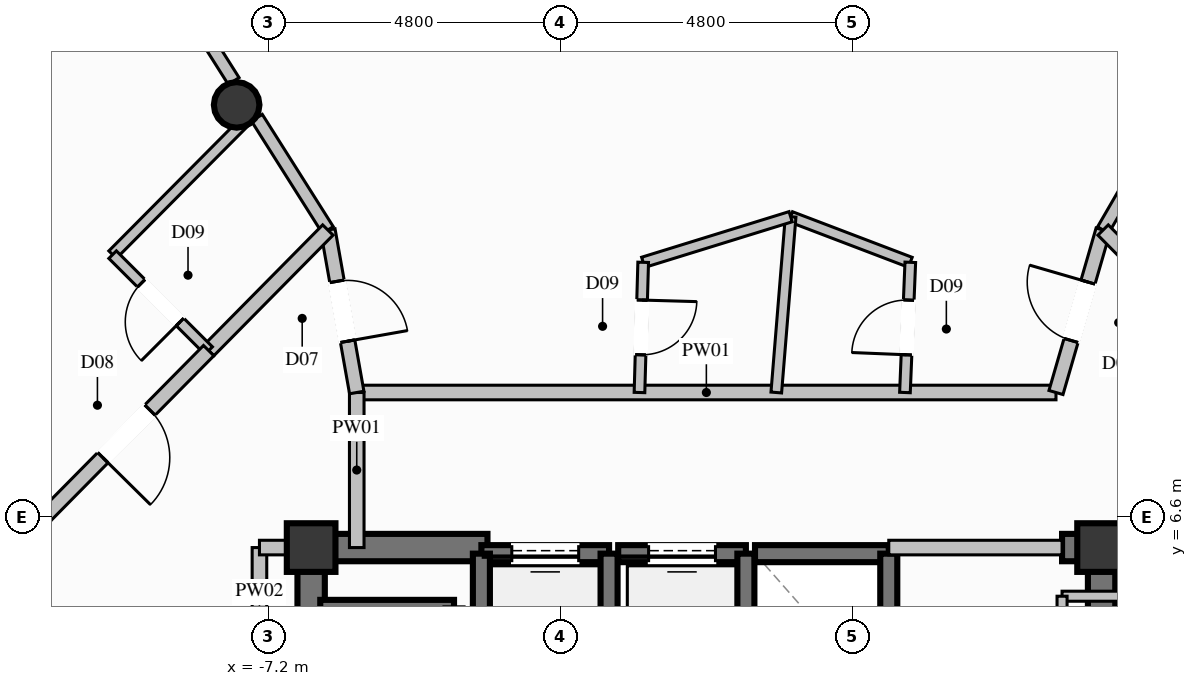
"""IFC4 building model, lengths in metres.
Left out: names, types, materials, properties, quantities, classifications, styles, units other than length and angle.
Written with IfcOpenShell. Run it as: python <this file> out.ifc"""

import sys

from ifc_helpers import new_model, si_unit, direction, frame, frame_2d, origin, origin_2d, place, context, subcontext, project, spatial, rectangle, circle, extrude, element, fill, save


model = new_model("IFC4")
c1 = context("Model", 3, precision=1e-05, world=origin(), true_north=direction((0.0, 1.0)))
c2 = subcontext(c1, "Body", "Model", "MODEL_VIEW")
j1 = project(units=[si_unit("LENGTHUNIT", "METRE"), si_unit("PLANEANGLEUNIT", "RADIAN")], contexts=[c1])
p1 = place(None, origin())
s1 = spatial("IfcSite", under=j1, at=p1, CompositionType="ELEMENT")
p2 = place(p1, origin())
s2 = spatial("IfcBuilding", under=s1, at=p2, CompositionType="ELEMENT")
p3 = place(p2, frame((0.0, 0.0, 289.6)))
s3 = spatial("IfcBuildingStorey", under=s2, at=p3, CompositionType="ELEMENT", Elevation=289.6)
for number, where, z_axis, x_axis in (
    (1, (6.5, 6.1, 0.0), (0.0, 0.0, 1.0), (1.0, 0.0, 0.0)),
    (2, (-6.5, 6.1, 0.0), (0.0, 0.0, 1.0), (1.0, 0.0, 0.0)),
):
    element("IfcColumn", number, at=place(p3, frame(where, z_axis=z_axis, x_axis=x_axis)), inside=s3, PredefinedType="COLUMN", context=c2, shape_type="SweptSolid", body=[
        extrude(rectangle(XDim=0.8, YDim=0.8, at=origin_2d()), origin(), (0.0, 0.0, 1.0), 3.8),
    ])
p4 = place(p3, frame((-6.275, 6.1, 0.0), z_axis=(0.0, 0.0, 1.0), x_axis=(1.0, 0.0, 0.0)))
e3 = element("IfcWall", 3, at=p4, inside=s3, PredefinedType="SHEAR", context=c2, shape_type="SweptSolid", body=[
    extrude(rectangle(XDim=2.675, YDim=0.45, at=frame_2d((1.337, 0.0))), origin(), (0.0, 0.0, 1.0), 3.8),
])
p5 = place(p3, frame((5.85, 6.1, 0.0), z_axis=(0.0, 0.0, 1.0), x_axis=(1.0, 0.0, 0.0)))
e4 = element("IfcWall", 4, at=p5, inside=s3, PredefinedType="SHEAR", context=c2, shape_type="SweptSolid", body=[
    extrude(rectangle(XDim=0.425, YDim=0.45, at=frame_2d((0.212, 0.0))), origin(), (0.0, 0.0, 1.0), 3.8),
])
p6 = place(p3, frame((-6.5, 2.35, 0.0), z_axis=(0.0, 0.0, 1.0), x_axis=(0.0, 1.0, 0.0)))
e5 = element("IfcWall", 5, at=p6, inside=s3, PredefinedType="SHEAR", context=c2, shape_type="SweptSolid", body=[
    extrude(rectangle(XDim=3.975, YDim=0.45, at=frame_2d((1.987, 0.0))), origin(), (0.0, 0.0, 1.0), 3.8),
])
p7 = place(p3, frame((6.5, 3.35, 0.0), z_axis=(0.0, 0.0, 1.0), x_axis=(0.0, 1.0, 0.0)))
e6 = element("IfcWall", 6, at=p7, inside=s3, PredefinedType="SHEAR", context=c2, shape_type="SweptSolid", body=[
    extrude(rectangle(XDim=2.975, YDim=0.45, at=frame_2d((1.487, 0.0))), origin(), (0.0, 0.0, 1.0), 3.8),
])
p8 = place(p3, frame((-7.725, 13.38, 0.0), z_axis=(0.0, 0.0, 1.0), x_axis=(1.0, 0.0, 0.0)))
e7 = element("IfcColumn", 7, at=p8, inside=s3, PredefinedType="COLUMN", context=c2, shape_type="SweptSolid", body=[
    extrude(circle(Radius=0.375, at=origin_2d()), origin(), (0.0, 0.0, 1.0), 3.8),
])
p9 = place(p3, frame((-1.6, 6.0, 0.0), z_axis=(0.0, 0.0, 1.0), x_axis=(-1.0, 0.0, 0.0)))
e8 = element("IfcWall", 8, at=p9, inside=s3, PredefinedType="SOLIDWALL", context=c2, shape_type="SweptSolid", body=[
    extrude(rectangle(XDim=2.1, YDim=0.28, at=frame_2d((1.05, 0.0))), origin(), (0.0, 0.0, 1.0), 3.57),
])
p10 = place(p9, frame((0.5, 0.0, 0.0)))
e9 = element("IfcOpeningElement", 9, at=p10, cuts=e8, PredefinedType="OPENING", context=c2, shape_type="SweptSolid", body=[
    extrude(rectangle(XDim=1.1, YDim=2.2, at=frame_2d((0.55, 1.1))), frame((0.0, 0.15, 0.0), z_axis=(0.0, -1.0, 0.0), x_axis=(1.0, 0.0, 0.0)), (0.0, 0.0, 1.0), 0.3),
])
for number, where, z_axis, x_axis in (
    (10, (-3.7, 6.0, 0.0), (0.0, 0.0, 1.0), (0.0, -1.0, 0.0)),
    (11, (-1.6, 3.5, 0.0), (0.0, 0.0, 1.0), (0.0, 1.0, 0.0)),
):
    element("IfcWall", number, at=place(p3, frame(where, z_axis=z_axis, x_axis=x_axis)), inside=s3, PredefinedType="SOLIDWALL", context=c2, shape_type="SweptSolid", body=[
        extrude(rectangle(XDim=2.5, YDim=0.28, at=frame_2d((1.25, 0.0))), origin(), (0.0, 0.0, 1.0), 3.57),
    ])
p11 = place(p3, frame((0.65, 6.0, 0.0), z_axis=(0.0, 0.0, 1.0), x_axis=(-1.0, 0.0, 0.0)))
e12 = element("IfcWall", 12, at=p11, inside=s3, PredefinedType="SOLIDWALL", context=c2, shape_type="SweptSolid", body=[
    extrude(rectangle(XDim=2.1, YDim=0.28, at=frame_2d((1.05, 0.0))), origin(), (0.0, 0.0, 1.0), 3.57),
])
p12 = place(p11, frame((0.5, 0.0, 0.0)))
e13 = element("IfcOpeningElement", 13, at=p12, cuts=e12, PredefinedType="OPENING", context=c2, shape_type="SweptSolid", body=[
    extrude(rectangle(XDim=1.1, YDim=2.2, at=frame_2d((0.55, 1.1))), frame((0.0, 0.15, 0.0), z_axis=(0.0, -1.0, 0.0), x_axis=(1.0, 0.0, 0.0)), (0.0, 0.0, 1.0), 0.3),
])
p13 = place(p3, frame((0.65, 3.5, 0.0), z_axis=(0.0, 0.0, 1.0), x_axis=(0.0, 1.0, 0.0)))
e14 = element("IfcWall", 14, at=p13, inside=s3, PredefinedType="SOLIDWALL", context=c2, shape_type="SweptSolid", body=[
    extrude(rectangle(XDim=2.5, YDim=0.28, at=frame_2d((1.25, 0.0))), origin(), (0.0, 0.0, 1.0), 3.57),
])
p14 = place(p3, frame((3.0, 6.0, 0.0), z_axis=(0.0, 0.0, 1.0), x_axis=(-1.0, 0.0, 0.0)))
e15 = element("IfcWall", 15, at=p14, inside=s3, PredefinedType="SOLIDWALL", context=c2, shape_type="SweptSolid", body=[
    extrude(rectangle(XDim=2.2, YDim=0.28, at=frame_2d((1.1, 0.0))), origin(), (0.0, 0.0, 1.0), 3.57),
])
p15 = place(p3, frame((3.0, 3.5, 0.0), z_axis=(0.0, 0.0, 1.0), x_axis=(0.0, 1.0, 0.0)))
e16 = element("IfcWall", 16, at=p15, inside=s3, PredefinedType="SOLIDWALL", context=c2, shape_type="SweptSolid", body=[
    extrude(rectangle(XDim=2.5, YDim=0.28, at=frame_2d((1.25, 0.0))), origin(), (0.0, 0.0, 1.0), 3.57),
])
p16 = place(p3, frame((-4.15, 5.1, 0.0), z_axis=(0.0, 0.0, 1.0), x_axis=(-1.0, 0.0, 0.0)))
e17 = element("IfcWall", 17, at=p16, inside=s3, PredefinedType="SOLIDWALL", context=c2, shape_type="SweptSolid", body=[
    extrude(rectangle(XDim=2.2, YDim=0.28, at=frame_2d((1.1, 0.0))), origin(), (0.0, 0.0, 1.0), 3.57),
])
p17 = place(p3, frame((-5.75, 8.65, 0.0), z_axis=(0.0, 0.0, 1.0), x_axis=(1.0, 0.0, 0.0)))
e18 = element("IfcWall", 18, at=p17, inside=s3, PredefinedType="PARTITIONING", context=c2, shape_type="SweptSolid", body=[
    extrude(rectangle(XDim=11.5, YDim=0.24, at=frame_2d((5.75, 0.0))), origin(), (0.0, 0.0, 1.0), 3.57),
])
p18 = place(p3, frame((3.0, 6.1, 0.0), z_axis=(0.0, 0.0, 1.0), x_axis=(1.0, 0.0, 0.0)))
e19 = element("IfcWall", 19, at=p18, inside=s3, PredefinedType="PARTITIONING", context=c2, shape_type="SweptSolid", body=[
    extrude(rectangle(XDim=2.85, YDim=0.24, at=frame_2d((1.425, 0.0))), origin(), (0.0, 0.0, 1.0), 2.655),
])
p19 = place(p3, frame((6.5, 6.1, 0.0), z_axis=(0.0, 0.0, 1.0), x_axis=(1.0, 0.0, 0.0)))
e20 = element("IfcWall", 20, at=p19, inside=s3, PredefinedType="PARTITIONING", context=c2, shape_type="SweptSolid", body=[
    extrude(rectangle(XDim=0.85, YDim=0.24, at=frame_2d((0.425, 0.0))), origin(), (0.0, 0.0, 1.0), 3.085),
])
p20 = place(p3, frame((-5.75, 6.1, 0.0), z_axis=(0.0, 0.0, 1.0), x_axis=(0.0, 1.0, 0.0)))
e21 = element("IfcWall", 21, at=p20, inside=s3, PredefinedType="PARTITIONING", context=c2, shape_type="SweptSolid", body=[
    extrude(rectangle(XDim=2.55, YDim=0.24, at=frame_2d((1.275, 0.0))), origin(), (0.0, 0.0, 1.0), 3.57),
])
p21 = place(p3, frame((-7.35, 4.95, 0.0), z_axis=(0.0, 0.0, 1.0), x_axis=(0.0, 1.0, 0.0)))
e22 = element("IfcWall", 22, at=p21, inside=s3, PredefinedType="PARTITIONING", context=c2, shape_type="SweptSolid", body=[
    extrude(rectangle(XDim=1.15, YDim=0.24, at=frame_2d((0.575, 0.0))), origin(), (0.0, 0.0, 1.0), 2.655),
])
p22 = place(p3, frame((-7.35, 6.1, 0.0), z_axis=(0.0, 0.0, 1.0), x_axis=(1.0, 0.0, 0.0)))
e23 = element("IfcWall", 23, at=p22, inside=s3, PredefinedType="PARTITIONING", context=c2, shape_type="SweptSolid", body=[
    extrude(rectangle(XDim=0.85, YDim=0.24, at=frame_2d((0.425, 0.0))), origin(), (0.0, 0.0, 1.0), 3.085),
])
p23 = place(p3, frame((7.35, 5.3, 0.0), z_axis=(0.0, 0.0, 1.0), x_axis=(-1.0, 0.0, 0.0)))
e24 = element("IfcWall", 24, at=p23, inside=s3, PredefinedType="PARTITIONING", context=c2, shape_type="SweptSolid", body=[
    extrude(rectangle(XDim=1.5, YDim=0.165, at=frame_2d((0.75, 0.0))), origin(), (0.0, 0.0, 1.0), 2.655),
])
p24 = place(p3, frame((5.85, 5.3, 0.0), z_axis=(0.0, 0.0, 1.0), x_axis=(0.0, -1.0, 0.0)))
e25 = element("IfcWall", 25, at=p24, inside=s3, PredefinedType="PARTITIONING", context=c2, shape_type="SweptSolid", body=[
    extrude(rectangle(XDim=2.55, YDim=0.165, at=frame_2d((1.275, 0.0))), origin(), (0.0, 0.0, 1.0), 2.655),
])
p25 = place(p3, frame((6.525, 11.322, 0.0), z_axis=(0.0, 0.0, 1.0), x_axis=(0.501738314133, 0.865019458817, 0.0)))
e26 = element("IfcWall", 26, at=p25, inside=s3, PredefinedType="PARTITIONING", context=c2, shape_type="SweptSolid", body=[
    extrude(rectangle(XDim=1.987, YDim=0.21, at=frame_2d((0.994, 0.0))), origin(), (0.0, 0.0, 1.0), 3.085),
])
p26 = place(p3, frame((-6.225, 11.322, 0.0), z_axis=(0.0, 0.0, 1.0), x_axis=(-0.534363069493, 0.845255056159, 0.0)))
e27 = element("IfcWall", 27, at=p26, inside=s3, PredefinedType="PARTITIONING", context=c2, shape_type="SweptSolid", body=[
    extrude(rectangle(XDim=2.184, YDim=0.21, at=frame_2d((1.092, 0.0))), origin(), (0.0, 0.0, 1.0), 3.085),
])
p27 = place(p3, frame((-7.774, 13.772, 0.0), z_axis=(0.0, 0.0, 1.0), x_axis=(-0.534464578877, 0.845190874256, 0.0)))
e28 = element("IfcWall", 28, at=p27, inside=s3, PredefinedType="PARTITIONING", context=c2, shape_type="SweptSolid", body=[
    extrude(rectangle(XDim=3.817, YDim=0.21, at=frame_2d((1.908, 0.0))), origin(), (0.0, 0.0, 1.0), 3.57),
])
p28 = place(p3, frame((1.386, 11.541, 0.0), z_axis=(0.0, 0.0, 1.0), x_axis=(0.934443654622, -0.356111016871, 0.0)))
e29 = element("IfcWall", 29, at=p28, inside=s3, PredefinedType="PLUMBINGWALL", context=c2, shape_type="SweptSolid", body=[
    extrude(rectangle(XDim=2.106, YDim=0.175, at=frame_2d((1.053, 0.0))), origin(), (0.0, 0.0, 1.0), 3.253),
])
p29 = place(p3, frame((1.386, 11.541, 0.0), z_axis=(0.0, 0.0, 1.0), x_axis=(-0.081387603682, -0.996682526167, 0.0)))
e30 = element("IfcWall", 30, at=p29, inside=s3, PredefinedType="PLUMBINGWALL", context=c2, shape_type="SweptSolid", body=[
    extrude(rectangle(XDim=2.901, YDim=0.175, at=frame_2d((1.45, 0.0))), origin(), (0.0, 0.0, 1.0), 3.57),
])
p30 = place(p3, frame((3.266, 8.65, 0.0), z_axis=(0.0, 0.0, 1.0), x_axis=(0.041014490153, 0.999158551781, 0.0)))
e31 = element("IfcWall", 31, at=p30, inside=s3, PredefinedType="PLUMBINGWALL", context=c2, shape_type="SweptSolid", body=[
    extrude(rectangle(XDim=2.143, YDim=0.175, at=frame_2d((1.071, 0.0))), origin(), (0.0, 0.0, 1.0), 3.57),
])
p31 = place(p30, frame((0.621, 0.0, 0.0)))
e32 = element("IfcOpeningElement", 32, at=p31, cuts=e31, PredefinedType="OPENING", context=c2, shape_type="SweptSolid", body=[
    extrude(rectangle(XDim=0.9, YDim=2.1, at=frame_2d((0.45, 1.05))), frame((0.0, 0.098, 0.0), z_axis=(0.0, -1.0, 0.0), x_axis=(1.0, 0.0, 0.0)), (0.0, 0.0, 1.0), 0.195),
])
p32 = place(p3, frame((5.75, 8.65, 0.0), z_axis=(0.0, 0.0, 1.0), x_axis=(0.27852040308, 0.960430312448, 0.0)))
e33 = element("IfcWall", 33, at=p32, inside=s3, PredefinedType="PARTITIONING", context=c2, shape_type="SweptSolid", body=[
    extrude(rectangle(XDim=2.782, YDim=0.24, at=frame_2d((1.391, 0.0))), origin(), (0.0, 0.0, 1.0), 3.57),
])
p33 = place(p32, frame((0.891, 0.0, 0.0)))
e34 = element("IfcOpeningElement", 34, at=p33, cuts=e33, PredefinedType="OPENING", context=c2, shape_type="SweptSolid", body=[
    extrude(rectangle(XDim=1.0, YDim=2.2, at=frame_2d((0.5, 1.1))), frame((0.0, 0.13, 0.0), z_axis=(0.0, -1.0, 0.0), x_axis=(1.0, 0.0, 0.0)), (0.0, 0.0, 1.0), 0.26),
])
p34 = place(p3, frame((-1.039, 10.791, 0.0), z_axis=(0.0, 0.0, 1.0), x_axis=(0.955353783444, 0.295464293037, 0.0)))
e35 = element("IfcWall", 35, at=p34, inside=s3, PredefinedType="PLUMBINGWALL", context=c2, shape_type="SweptSolid", body=[
    extrude(rectangle(XDim=2.538, YDim=0.175, at=frame_2d((1.269, 0.0))), origin(), (0.0, 0.0, 1.0), 3.253),
])
p35 = place(p3, frame((-1.039, 10.791, 0.0), z_axis=(0.0, 0.0, 1.0), x_axis=(-0.028494696229, -0.999593943703, 0.0)))
e36 = element("IfcWall", 36, at=p35, inside=s3, PredefinedType="PLUMBINGWALL", context=c2, shape_type="SweptSolid", body=[
    extrude(rectangle(XDim=2.142, YDim=0.175, at=frame_2d((1.071, 0.0))), origin(), (0.0, 0.0, 1.0), 3.57),
])
p36 = place(p35, frame((0.621, 0.0, 0.0)))
e37 = element("IfcOpeningElement", 37, at=p36, cuts=e36, PredefinedType="OPENING", context=c2, shape_type="SweptSolid", body=[
    extrude(rectangle(XDim=0.9, YDim=2.1, at=frame_2d((0.45, 1.05))), frame((0.0, 0.098, 0.0), z_axis=(0.0, -1.0, 0.0), x_axis=(1.0, 0.0, 0.0)), (0.0, 0.0, 1.0), 0.195),
])
p37 = place(p3, frame((-6.225, 11.322, 0.0), z_axis=(0.0, 0.0, 1.0), x_axis=(0.175052712288, -0.984559062688, 0.0)))
e38 = element("IfcWall", 38, at=p37, inside=s3, PredefinedType="PARTITIONING", context=c2, shape_type="SweptSolid", body=[
    extrude(rectangle(XDim=2.714, YDim=0.24, at=frame_2d((1.357, 0.0))), origin(), (0.0, 0.0, 1.0), 3.57),
])
p38 = place(p37, frame((0.857, 0.0, 0.0)))
e39 = element("IfcOpeningElement", 39, at=p38, cuts=e38, PredefinedType="OPENING", context=c2, shape_type="SweptSolid", body=[
    extrude(rectangle(XDim=1.0, YDim=2.2, at=frame_2d((0.5, 1.1))), frame((0.0, 0.13, 0.0), z_axis=(0.0, -1.0, 0.0), x_axis=(1.0, 0.0, 0.0)), (0.0, 0.0, 1.0), 0.26),
])
p39 = place(p3, frame((-6.225, 11.322, 0.0), z_axis=(0.0, 0.0, 1.0), x_axis=(-0.702979205765, -0.711210402245, 0.0)))
e40 = element("IfcWall", 40, at=p39, inside=s3, PredefinedType="PARTITIONING", context=c2, shape_type="SweptSolid", body=[
    extrude(rectangle(XDim=2.788, YDim=0.24, at=frame_2d((1.394, 0.0))), origin(), (0.0, 0.0, 1.0), 3.57),
])
p40 = place(p3, frame((-7.445, 13.252, 0.0), z_axis=(0.0, 0.0, 1.0), x_axis=(-0.704803641047, -0.709402444009, 0.0)))
e41 = element("IfcWall", 41, at=p40, inside=s3, PredefinedType="PLUMBINGWALL", context=c2, shape_type="SweptSolid", body=[
    extrude(rectangle(XDim=3.292, YDim=0.175, at=frame_2d((1.646, 0.0))), origin(), (0.0, 0.0, 1.0), 3.138),
])
p41 = place(p3, frame((-8.185, 9.339, 0.0), z_axis=(0.0, 0.0, 1.0), x_axis=(-0.707544008936, 0.706669282917, 0.0)))
e42 = element("IfcWall", 42, at=p41, inside=s3, PredefinedType="PLUMBINGWALL", context=c2, shape_type="SweptSolid", body=[
    extrude(rectangle(XDim=2.233, YDim=0.175, at=frame_2d((1.116, 0.0))), origin(), (0.0, 0.0, 1.0), 3.57),
])
p42 = place(p41, frame((0.667, 0.0, 0.0)))
e43 = element("IfcOpeningElement", 43, at=p42, cuts=e42, PredefinedType="OPENING", context=c2, shape_type="SweptSolid", body=[
    extrude(rectangle(XDim=0.9, YDim=2.1, at=frame_2d((0.45, 1.05))), frame((0.0, 0.098, 0.0), z_axis=(0.0, -1.0, 0.0), x_axis=(1.0, 0.0, 0.0)), (0.0, 0.0, 1.0), 0.195),
])
p43 = place(p3, frame((-8.185, 9.339, 0.0), z_axis=(0.0, 0.0, 1.0), x_axis=(-0.702942107486, -0.711247069254, 0.0)))
e44 = element("IfcWall", 44, at=p43, inside=s3, PredefinedType="PARTITIONING", context=c2, shape_type="SweptSolid", body=[
    extrude(rectangle(XDim=3.851, YDim=0.24, at=frame_2d((1.926, 0.0))), origin(), (0.0, 0.0, 1.0), 3.57),
])
p44 = place(p43, frame((1.375, 0.0, 0.0)))
e45 = element("IfcOpeningElement", 45, at=p44, cuts=e44, PredefinedType="OPENING", context=c2, shape_type="SweptSolid", body=[
    extrude(rectangle(XDim=1.1, YDim=2.3, at=frame_2d((0.55, 1.15))), frame((0.0, 0.13, 0.0), z_axis=(0.0, -1.0, 0.0), x_axis=(1.0, 0.0, 0.0)), (0.0, 0.0, 1.0), 0.26),
])
p45 = place(p3, frame((9.232, 8.583, 0.0), z_axis=(0.0, 0.0, 1.0), x_axis=(-0.702942107486, 0.711247069254, 0.0)))
e46 = element("IfcWall", 46, at=p45, inside=s3, PredefinedType="PARTITIONING", context=c2, shape_type="SweptSolid", body=[
    extrude(rectangle(XDim=3.851, YDim=0.24, at=frame_2d((1.926, 0.0))), origin(), (0.0, 0.0, 1.0), 3.57),
])
p46 = place(p45, frame((1.425, 0.0, 0.0)))
e47 = element("IfcOpeningElement", 47, at=p46, cuts=e46, PredefinedType="OPENING", context=c2, shape_type="SweptSolid", body=[
    extrude(rectangle(XDim=1.0, YDim=2.2, at=frame_2d((0.5, 1.1))), frame((0.0, 0.13, 0.0), z_axis=(0.0, -1.0, 0.0), x_axis=(1.0, 0.0, 0.0)), (0.0, 0.0, 1.0), 0.26),
])
p47 = place(p10, origin())
e48 = element("IfcDoor", 48, at=p47, inside=s3, OperationType="SLIDING_TO_LEFT", PredefinedType="DOOR", context=c2, shape_type="SweptSolid", body=[
    extrude(rectangle(XDim=1.1, YDim=2.2, at=frame_2d((0.55, 1.1))), frame((0.0, 0.025, 0.0), z_axis=(0.0, -1.0, 0.0), x_axis=(1.0, 0.0, 0.0)), (0.0, 0.0, 1.0), 0.05),
])
fill(e9, e48)
p48 = place(p12, origin())
e49 = element("IfcDoor", 49, at=p48, inside=s3, OperationType="SLIDING_TO_LEFT", PredefinedType="DOOR", context=c2, shape_type="SweptSolid", body=[
    extrude(rectangle(XDim=1.1, YDim=2.2, at=frame_2d((0.55, 1.1))), frame((0.0, 0.025, 0.0), z_axis=(0.0, -1.0, 0.0), x_axis=(1.0, 0.0, 0.0)), (0.0, 0.0, 1.0), 0.05),
])
fill(e13, e49)
p49 = place(p31, origin())
e50 = element("IfcDoor", 50, at=p49, inside=s3, OperationType="SINGLE_SWING_LEFT", PredefinedType="DOOR", context=c2, shape_type="SweptSolid", body=[
    extrude(rectangle(XDim=0.9, YDim=2.1, at=frame_2d((0.45, 1.05))), frame((0.0, 0.025, 0.0), z_axis=(0.0, -1.0, 0.0), x_axis=(1.0, 0.0, 0.0)), (0.0, 0.0, 1.0), 0.05),
])
fill(e32, e50)
p50 = place(p33, origin())
e51 = element("IfcDoor", 51, at=p50, inside=s3, OperationType="SINGLE_SWING_RIGHT", PredefinedType="DOOR", context=c2, shape_type="SweptSolid", body=[
    extrude(rectangle(XDim=1.0, YDim=2.2, at=frame_2d((0.5, 1.1))), frame((0.0, 0.025, 0.0), z_axis=(0.0, -1.0, 0.0), x_axis=(1.0, 0.0, 0.0)), (0.0, 0.0, 1.0), 0.05),
])
fill(e34, e51)
p51 = place(p36, origin())
e52 = element("IfcDoor", 52, at=p51, inside=s3, OperationType="SINGLE_SWING_LEFT", PredefinedType="DOOR", context=c2, shape_type="SweptSolid", body=[
    extrude(rectangle(XDim=0.9, YDim=2.1, at=frame_2d((0.45, 1.05))), frame((0.0, 0.025, 0.0), z_axis=(0.0, -1.0, 0.0), x_axis=(1.0, 0.0, 0.0)), (0.0, 0.0, 1.0), 0.05),
])
fill(e37, e52)
p52 = place(p38, origin())
e53 = element("IfcDoor", 53, at=p52, inside=s3, OperationType="SINGLE_SWING_RIGHT", PredefinedType="DOOR", context=c2, shape_type="SweptSolid", body=[
    extrude(rectangle(XDim=1.0, YDim=2.2, at=frame_2d((0.5, 1.1))), frame((0.0, 0.025, 0.0), z_axis=(0.0, -1.0, 0.0), x_axis=(1.0, 0.0, 0.0)), (0.0, 0.0, 1.0), 0.05),
])
fill(e39, e53)
p53 = place(p42, origin())
e54 = element("IfcDoor", 54, at=p53, inside=s3, OperationType="SINGLE_SWING_LEFT", PredefinedType="DOOR", context=c2, shape_type="SweptSolid", body=[
    extrude(rectangle(XDim=0.9, YDim=2.1, at=frame_2d((0.45, 1.05))), frame((0.0, 0.025, 0.0), z_axis=(0.0, -1.0, 0.0), x_axis=(1.0, 0.0, 0.0)), (0.0, 0.0, 1.0), 0.05),
])
fill(e43, e54)
p54 = place(p44, origin())
e55 = element("IfcDoor", 55, at=p54, inside=s3, OperationType="SINGLE_SWING_RIGHT", PredefinedType="DOOR", context=c2, shape_type="SweptSolid", body=[
    extrude(rectangle(XDim=1.1, YDim=2.3, at=frame_2d((0.55, 1.15))), frame((0.0, 0.025, 0.0), z_axis=(0.0, -1.0, 0.0), x_axis=(1.0, 0.0, 0.0)), (0.0, 0.0, 1.0), 0.05),
])
fill(e45, e55)
save(model, sys.argv[1])
